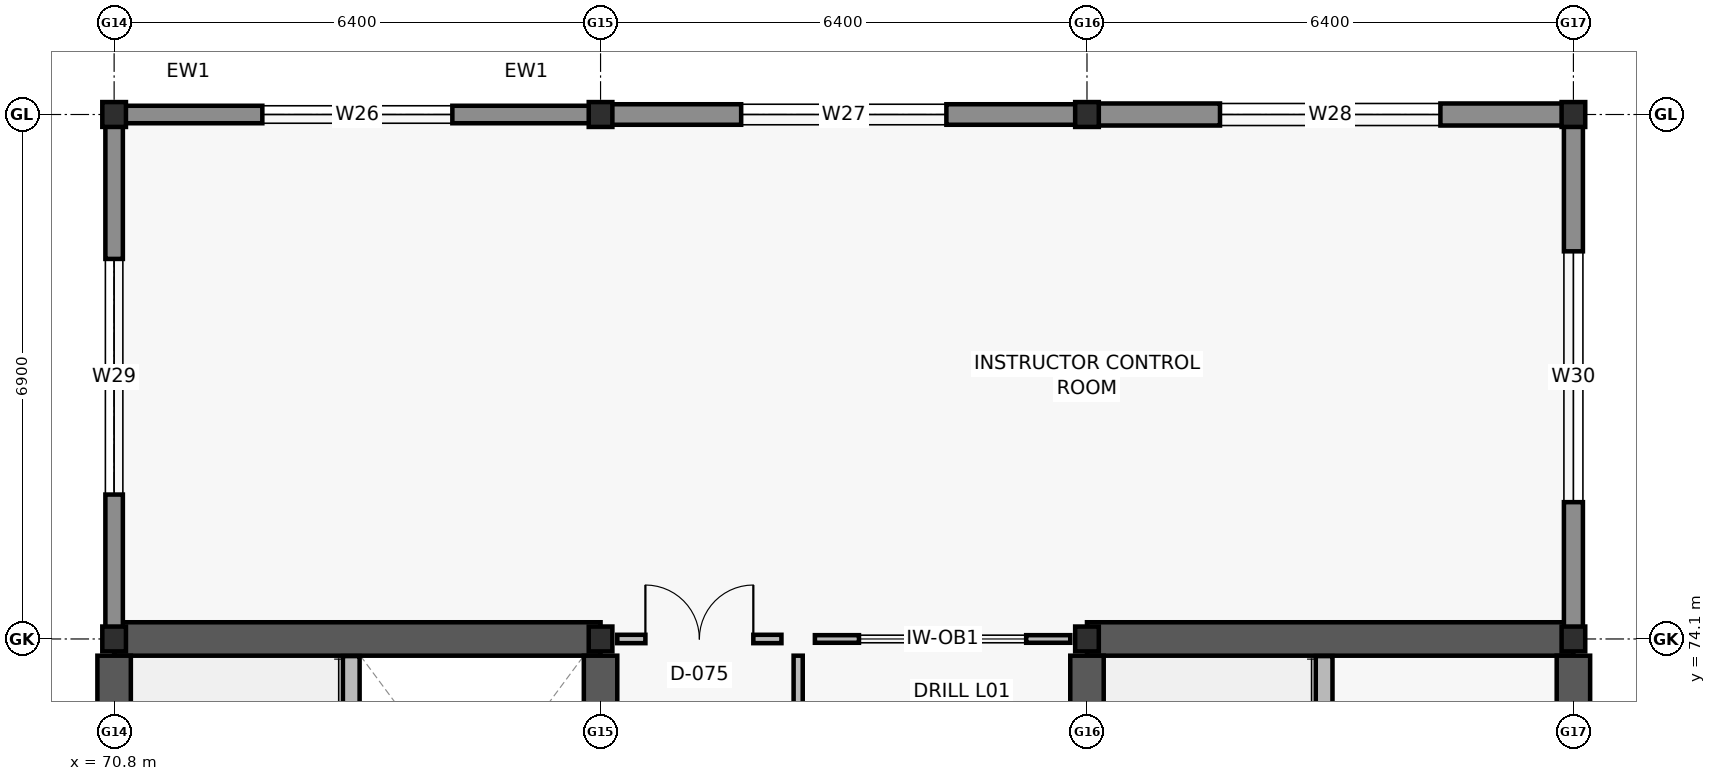
"""IFC4 building model, lengths in metres.
Left out: names, types, materials, properties, quantities, classifications, styles, units other than length and angle.
Written with IfcOpenShell. Run it as: python <this file> out.ifc"""

import sys

from ifc_helpers import new_model, si_unit, direction, frame, frame_2d, origin, origin_2d, place, context, subcontext, project, spatial, rectangle, i_section, extrude, element, fill, save


model = new_model("IFC4")
c1 = context("Model", 3, precision=1e-05, world=origin(), true_north=direction((0.0, 1.0)))
c2 = subcontext(c1, "Body", "Model", "MODEL_VIEW")
j1 = project(units=[si_unit("LENGTHUNIT", "METRE"), si_unit("PLANEANGLEUNIT", "RADIAN")], contexts=[c1])
p1 = place(None, origin())
s1 = spatial("IfcSite", under=j1, at=p1, CompositionType="ELEMENT")
p2 = place(p1, origin())
s2 = spatial("IfcBuilding", under=s1, at=p2, CompositionType="ELEMENT")
p3 = place(p2, frame((0.0, 0.0, 5.4)))
s3 = spatial("IfcBuildingStorey", under=s2, at=p3, CompositionType="ELEMENT", Elevation=5.4)
for number, where, z_axis, x_axis in (
    (1, (70.8, 74.1, 0.0), (0.0, 0.0, 1.0), (1.0, 0.0, 0.0)),
    (2, (70.8, 81.0, 0.0), (0.0, 0.0, 1.0), (1.0, 0.0, 0.0)),
    (3, (77.2, 74.1, 0.0), (0.0, 0.0, 1.0), (1.0, 0.0, 0.0)),
    (4, (77.2, 81.0, 0.0), (0.0, 0.0, 1.0), (1.0, 0.0, 0.0)),
    (5, (83.6, 74.1, 0.0), (0.0, 0.0, 1.0), (1.0, 0.0, 0.0)),
    (6, (83.6, 81.0, 0.0), (0.0, 0.0, 1.0), (1.0, 0.0, 0.0)),
    (7, (90.0, 74.1, 0.0), (0.0, 0.0, 1.0), (1.0, 0.0, 0.0)),
    (8, (90.0, 81.0, 0.0), (0.0, 0.0, 1.0), (1.0, 0.0, 0.0)),
):
    element("IfcColumn", number, at=place(p3, frame(where, z_axis=z_axis, x_axis=x_axis)), inside=s3, PredefinedType="COLUMN", context=c2, shape_type="SweptSolid", body=[
        extrude(i_section(OverallWidth=0.311, OverallDepth=0.327, WebThickness=0.016, FlangeThickness=0.025, FilletRadius=0.017, at=origin_2d()), origin(), (0.0, 0.0, 1.0), 4.2),
    ])
p4 = place(p3, frame((70.8, 74.1, 0.0), z_axis=(0.0, 0.0, 1.0), x_axis=(1.0, 0.0, 0.0)))
e9 = element("IfcWall", 9, at=p4, inside=s3, PredefinedType="SHEAR", context=c2, shape_type="SweptSolid", body=[
    extrude(rectangle(XDim=6.4, YDim=0.44, at=frame_2d((3.2, 0.0))), origin(), (0.0, 0.0, 1.0), 3.96),
])
for number, where, z_axis, x_axis in (
    (10, (70.8, 67.2, 0.0), (0.0, 0.0, 1.0), (0.0, 1.0, 0.0)),
    (11, (77.2, 67.2, 0.0), (0.0, 0.0, 1.0), (0.0, 1.0, 0.0)),
):
    element("IfcWall", number, at=place(p3, frame(where, z_axis=z_axis, x_axis=x_axis)), inside=s3, PredefinedType="SHEAR", context=c2, shape_type="SweptSolid", body=[
        extrude(rectangle(XDim=6.68, YDim=0.44, at=frame_2d((3.34, 0.0))), origin(), (0.0, 0.0, 1.0), 3.96),
    ])
p5 = place(p3, frame((83.6, 74.1, 0.0), z_axis=(0.0, 0.0, 1.0), x_axis=(1.0, 0.0, 0.0)))
e12 = element("IfcWall", 12, at=p5, inside=s3, PredefinedType="SHEAR", context=c2, shape_type="SweptSolid", body=[
    extrude(rectangle(XDim=6.4, YDim=0.44, at=frame_2d((3.2, 0.0))), origin(), (0.0, 0.0, 1.0), 3.96),
])
for number, where, z_axis, x_axis in (
    (13, (83.6, 67.2, 0.0), (0.0, 0.0, 1.0), (0.0, 1.0, 0.0)),
    (14, (90.0, 67.2, 0.0), (0.0, 0.0, 1.0), (0.0, 1.0, 0.0)),
):
    element("IfcWall", number, at=place(p3, frame(where, z_axis=z_axis, x_axis=x_axis)), inside=s3, PredefinedType="SHEAR", context=c2, shape_type="SweptSolid", body=[
        extrude(rectangle(XDim=6.68, YDim=0.44, at=frame_2d((3.34, 0.0))), origin(), (0.0, 0.0, 1.0), 3.96),
    ])
p6 = place(p3, frame((70.805, 81.0, 0.0), z_axis=(0.0, 0.0, 1.0), x_axis=(1.0, 0.0, 0.0)))
e15 = element("IfcWall", 15, at=p6, inside=s3, PredefinedType="SOLIDWALL", context=c2, shape_type="SweptSolid", body=[
    extrude(rectangle(XDim=6.39, YDim=0.23, at=frame_2d((3.195, 0.0))), origin(), (0.0, 0.0, 1.0), 3.32),
])
p7 = place(p6, frame((1.945, 0.0, 0.8)))
e16 = element("IfcOpeningElement", 16, at=p7, cuts=e15, PredefinedType="OPENING", context=c2, shape_type="SweptSolid", body=[
    extrude(rectangle(XDim=2.5, YDim=1.15, at=frame_2d((1.25, 0.575))), frame((0.0, 0.125, 0.0), z_axis=(0.0, -1.0, 0.0), x_axis=(1.0, 0.0, 0.0)), (0.0, 0.0, 1.0), 0.25),
])
p8 = place(p3, frame((77.205, 81.0, 0.0), z_axis=(0.0, 0.0, 1.0), x_axis=(1.0, 0.0, 0.0)))
e17 = element("IfcWall", 17, at=p8, inside=s3, PredefinedType="SOLIDWALL", context=c2, shape_type="SweptSolid", body=[
    extrude(rectangle(XDim=6.39, YDim=0.27, at=frame_2d((3.195, 0.0))), origin(), (0.0, 0.0, 1.0), 3.32),
])
p9 = place(p8, frame((1.845, 0.0, 0.8)))
e18 = element("IfcOpeningElement", 18, at=p9, cuts=e17, PredefinedType="OPENING", context=c2, shape_type="SweptSolid", body=[
    extrude(rectangle(XDim=2.7, YDim=1.15, at=frame_2d((1.35, 0.575))), frame((0.0, 0.145, 0.0), z_axis=(0.0, -1.0, 0.0), x_axis=(1.0, 0.0, 0.0)), (0.0, 0.0, 1.0), 0.29),
])
p10 = place(p3, frame((83.605, 81.0, 0.0), z_axis=(0.0, 0.0, 1.0), x_axis=(1.0, 0.0, 0.0)))
e19 = element("IfcWall", 19, at=p10, inside=s3, PredefinedType="SOLIDWALL", context=c2, shape_type="SweptSolid", body=[
    extrude(rectangle(XDim=6.39, YDim=0.29, at=frame_2d((3.195, 0.0))), origin(), (0.0, 0.0, 1.0), 3.32),
])
p11 = place(p10, frame((1.745, 0.0, 0.8)))
e20 = element("IfcOpeningElement", 20, at=p11, cuts=e19, PredefinedType="OPENING", context=c2, shape_type="SweptSolid", body=[
    extrude(rectangle(XDim=2.9, YDim=1.15, at=frame_2d((1.45, 0.575))), frame((0.0, 0.155, 0.0), z_axis=(0.0, -1.0, 0.0), x_axis=(1.0, 0.0, 0.0)), (0.0, 0.0, 1.0), 0.31),
])
p12 = place(p3, frame((70.8, 74.105, 0.0), z_axis=(0.0, 0.0, 1.0), x_axis=(0.0, 1.0, 0.0)))
e21 = element("IfcWall", 21, at=p12, inside=s3, PredefinedType="SOLIDWALL", context=c2, shape_type="SweptSolid", body=[
    extrude(rectangle(XDim=6.89, YDim=0.23, at=frame_2d((3.445, 0.0))), origin(), (0.0, 0.0, 1.0), 3.32),
])
p13 = place(p12, frame((1.895, 0.0, 0.8)))
e22 = element("IfcOpeningElement", 22, at=p13, cuts=e21, PredefinedType="OPENING", context=c2, shape_type="SweptSolid", body=[
    extrude(rectangle(XDim=3.1, YDim=1.15, at=frame_2d((1.55, 0.575))), frame((0.0, 0.125, 0.0), z_axis=(0.0, -1.0, 0.0), x_axis=(1.0, 0.0, 0.0)), (0.0, 0.0, 1.0), 0.25),
])
p14 = place(p3, frame((90.0, 80.995, 0.0), z_axis=(0.0, 0.0, 1.0), x_axis=(0.0, -1.0, 0.0)))
e23 = element("IfcWall", 23, at=p14, inside=s3, PredefinedType="SOLIDWALL", context=c2, shape_type="SweptSolid", body=[
    extrude(rectangle(XDim=6.89, YDim=0.25, at=frame_2d((3.445, 0.0))), origin(), (0.0, 0.0, 1.0), 3.32),
])
p15 = place(p14, frame((1.795, 0.0, 0.8)))
e24 = element("IfcOpeningElement", 24, at=p15, cuts=e23, PredefinedType="OPENING", context=c2, shape_type="SweptSolid", body=[
    extrude(rectangle(XDim=3.3, YDim=1.25, at=frame_2d((1.65, 0.625))), frame((0.0, 0.135, 0.0), z_axis=(0.0, -1.0, 0.0), x_axis=(1.0, 0.0, 0.0)), (0.0, 0.0, 1.0), 0.27),
])
for number, where, z_axis, x_axis in (
    (25, (73.92, 67.32, 0.0), (0.0, 0.0, 1.0), (0.0, 1.0, 0.0)),
    (26, (86.72, 67.32, 0.0), (0.0, 0.0, 1.0), (0.0, 1.0, 0.0)),
):
    element("IfcWall", number, at=place(p3, frame(where, z_axis=z_axis, x_axis=x_axis)), inside=s3, PredefinedType="SOLIDWALL", context=c2, shape_type="SweptSolid", body=[
        extrude(rectangle(XDim=6.555, YDim=0.22, at=frame_2d((3.277, 0.0))), origin(), (0.0, 0.0, 1.0), 3.96),
    ])
p16 = place(p3, frame((79.8, 67.42, 0.0), z_axis=(0.0, 0.0, 1.0), x_axis=(0.0, 1.0, 0.0)))
e27 = element("IfcWall", 27, at=p16, inside=s3, PredefinedType="PARTITIONING", context=c2, shape_type="SweptSolid", body=[
    extrude(rectangle(XDim=6.46, YDim=0.12, at=frame_2d((3.23, 0.0))), origin(), (0.0, 0.0, 1.0), 3.3),
])
p17 = place(p16, frame((2.55, 0.0, 0.0)))
e28 = element("IfcOpeningElement", 28, at=p17, cuts=e27, PredefinedType="OPENING", context=c2, shape_type="SweptSolid", body=[
    extrude(rectangle(XDim=1.36, YDim=2.15, at=frame_2d((0.68, 1.075))), frame((0.0, 0.07, 0.0), z_axis=(0.0, -1.0, 0.0), x_axis=(1.0, 0.0, 0.0)), (0.0, 0.0, 1.0), 0.14),
])
p18 = place(p3, frame((77.42, 74.1, 0.0), z_axis=(0.0, 0.0, 1.0), x_axis=(1.0, 0.0, 0.0)))
e29 = element("IfcWall", 29, at=p18, inside=s3, PredefinedType="PARTITIONING", context=c2, shape_type="SweptSolid", body=[
    extrude(rectangle(XDim=2.16, YDim=0.11, at=frame_2d((1.08, 0.0))), origin(), (0.0, 0.0, 1.0), 3.3),
])
p19 = place(p18, frame((0.37, 0.0, 0.0)))
e30 = element("IfcOpeningElement", 30, at=p19, cuts=e29, PredefinedType="OPENING", context=c2, shape_type="SweptSolid", body=[
    extrude(rectangle(XDim=1.42, YDim=2.15, at=frame_2d((0.71, 1.075))), frame((0.0, 0.065, 0.0), z_axis=(0.0, -1.0, 0.0), x_axis=(1.0, 0.0, 0.0)), (0.0, 0.0, 1.0), 0.13),
])
p20 = place(p3, frame((80.02, 74.1, 0.0), z_axis=(0.0, 0.0, 1.0), x_axis=(1.0, 0.0, 0.0)))
e31 = element("IfcWall", 31, at=p20, inside=s3, PredefinedType="PARTITIONING", context=c2, shape_type="SweptSolid", body=[
    extrude(rectangle(XDim=3.36, YDim=0.1, at=frame_2d((1.68, 0.0))), origin(), (0.0, 0.0, 1.0), 3.3),
])
p21 = place(p20, frame((0.58, 0.0, 0.95)))
e32 = element("IfcOpeningElement", 32, at=p21, cuts=e31, PredefinedType="OPENING", context=c2, shape_type="SweptSolid", body=[
    extrude(rectangle(XDim=2.2, YDim=1.3, at=frame_2d((1.1, 0.65))), frame((0.0, 0.06, 0.0), z_axis=(0.0, -1.0, 0.0), x_axis=(1.0, 0.0, 0.0)), (0.0, 0.0, 1.0), 0.12),
])
p22 = place(p7, origin())
e33 = element("IfcWindow", 33, at=p22, inside=s3, PartitioningType="TRIPLE_PANEL_VERTICAL", PredefinedType="WINDOW", context=c2, shape_type="SweptSolid", body=[
    extrude(rectangle(XDim=2.5, YDim=1.15, at=frame_2d((1.25, 0.575))), frame((0.0, 0.03, 0.0), z_axis=(0.0, -1.0, 0.0), x_axis=(1.0, 0.0, 0.0)), (0.0, 0.0, 1.0), 0.06),
])
fill(e16, e33)
p23 = place(p9, origin())
e34 = element("IfcWindow", 34, at=p23, inside=s3, PartitioningType="TRIPLE_PANEL_VERTICAL", PredefinedType="WINDOW", context=c2, shape_type="SweptSolid", body=[
    extrude(rectangle(XDim=2.7, YDim=1.15, at=frame_2d((1.35, 0.575))), frame((0.0, 0.03, 0.0), z_axis=(0.0, -1.0, 0.0), x_axis=(1.0, 0.0, 0.0)), (0.0, 0.0, 1.0), 0.06),
])
fill(e18, e34)
p24 = place(p11, origin())
e35 = element("IfcWindow", 35, at=p24, inside=s3, PartitioningType="TRIPLE_PANEL_VERTICAL", PredefinedType="WINDOW", context=c2, shape_type="SweptSolid", body=[
    extrude(rectangle(XDim=2.9, YDim=1.15, at=frame_2d((1.45, 0.575))), frame((0.0, 0.03, 0.0), z_axis=(0.0, -1.0, 0.0), x_axis=(1.0, 0.0, 0.0)), (0.0, 0.0, 1.0), 0.06),
])
fill(e20, e35)
p25 = place(p13, origin())
e36 = element("IfcWindow", 36, at=p25, inside=s3, PartitioningType="TRIPLE_PANEL_VERTICAL", PredefinedType="WINDOW", context=c2, shape_type="SweptSolid", body=[
    extrude(rectangle(XDim=3.1, YDim=1.15, at=frame_2d((1.55, 0.575))), frame((0.0, 0.03, 0.0), z_axis=(0.0, -1.0, 0.0), x_axis=(1.0, 0.0, 0.0)), (0.0, 0.0, 1.0), 0.06),
])
fill(e22, e36)
p26 = place(p15, origin())
e37 = element("IfcWindow", 37, at=p26, inside=s3, PartitioningType="TRIPLE_PANEL_VERTICAL", PredefinedType="WINDOW", context=c2, shape_type="SweptSolid", body=[
    extrude(rectangle(XDim=3.3, YDim=1.25, at=frame_2d((1.65, 0.625))), frame((0.0, 0.03, 0.0), z_axis=(0.0, -1.0, 0.0), x_axis=(1.0, 0.0, 0.0)), (0.0, 0.0, 1.0), 0.06),
])
fill(e24, e37)
p27 = place(p19, origin())
e38 = element("IfcDoor", 38, at=p27, inside=s3, OperationType="DOUBLE_DOOR_SINGLE_SWING", PredefinedType="DOOR", context=c2, shape_type="SweptSolid", body=[
    extrude(rectangle(XDim=1.42, YDim=2.15, at=frame_2d((0.71, 1.075))), frame((0.0, 0.025, 0.0), z_axis=(0.0, -1.0, 0.0), x_axis=(1.0, 0.0, 0.0)), (0.0, 0.0, 1.0), 0.05),
])
fill(e30, e38)
p28 = place(p21, origin())
e39 = element("IfcWindow", 39, at=p28, inside=s3, PartitioningType="DOUBLE_PANEL_VERTICAL", PredefinedType="WINDOW", context=c2, shape_type="SweptSolid", body=[
    extrude(rectangle(XDim=2.2, YDim=1.3, at=frame_2d((1.1, 0.65))), frame((0.0, 0.03, 0.0), z_axis=(0.0, -1.0, 0.0), x_axis=(1.0, 0.0, 0.0)), (0.0, 0.0, 1.0), 0.06),
])
fill(e32, e39)
save(model, sys.argv[1])
